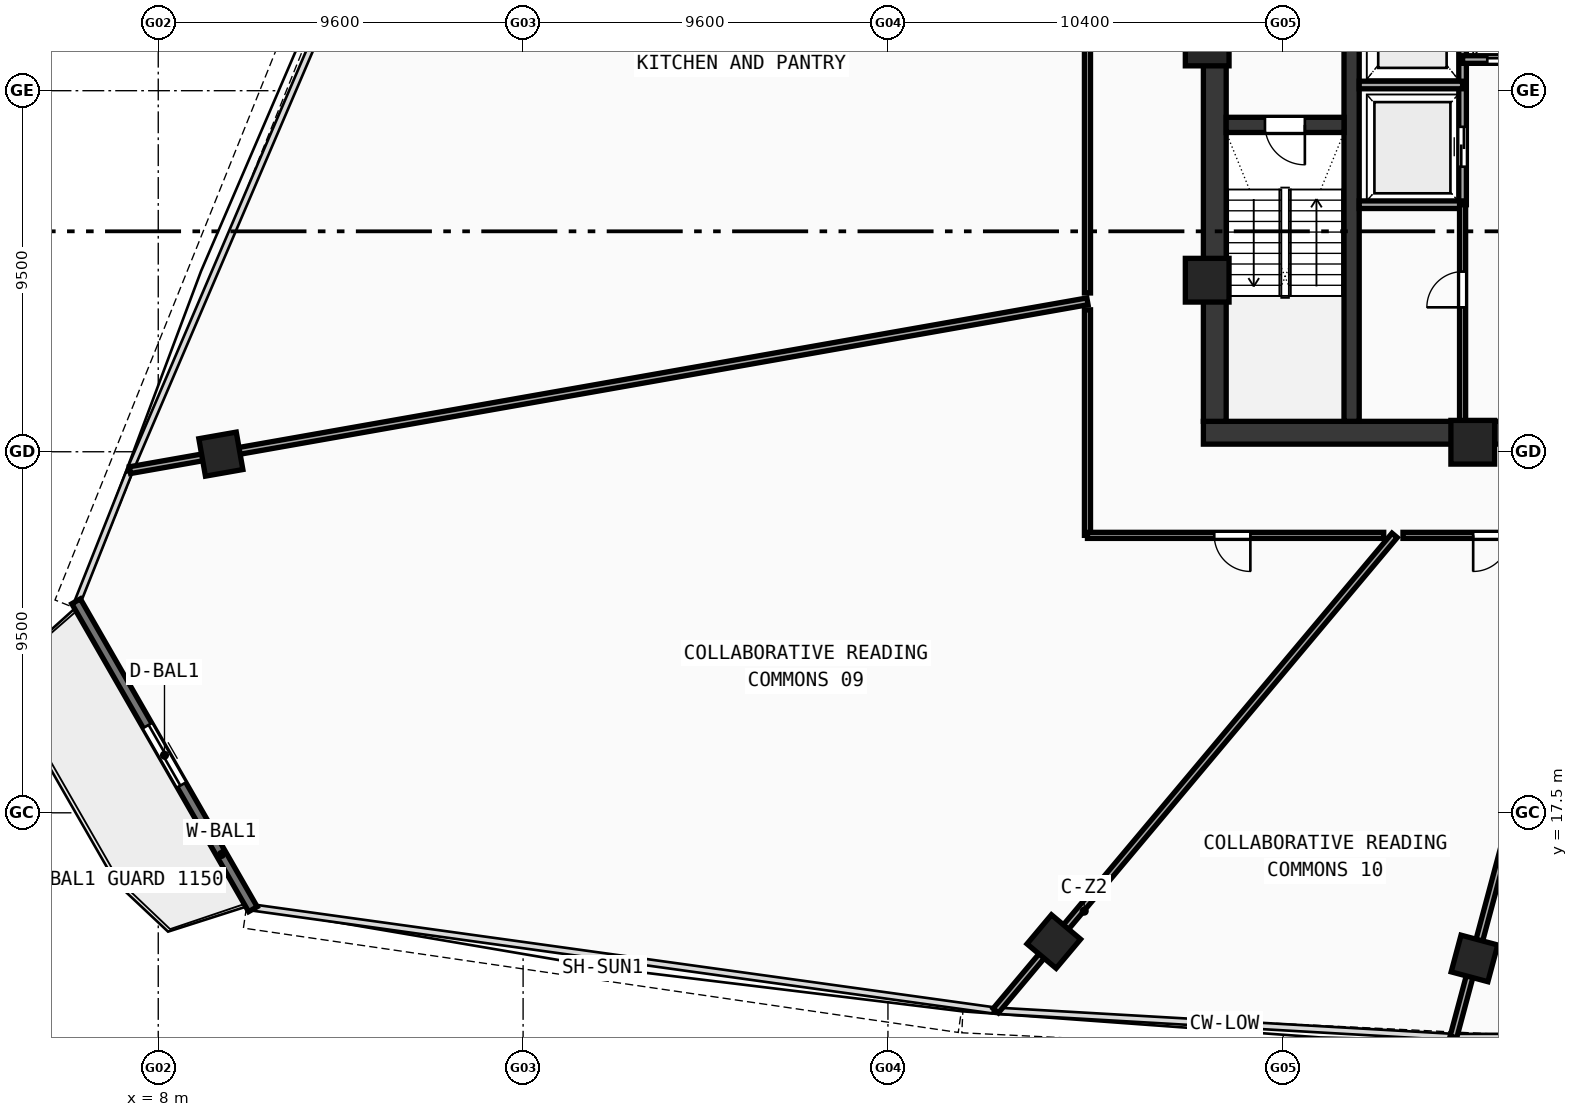
"""IFC4 building model, lengths in metres.
Left out: names, types, materials, properties, quantities, classifications, styles, units other than length and angle.
Written with IfcOpenShell. Run it as: python <this file> out.ifc"""

import sys

from ifc_helpers import new_model, si_unit, direction, frame, frame_2d, origin, origin_with_axes, origin_2d, place, context, subcontext, project, spatial, rectangle, hollow_rectangle, extrude, source, transform, mapped, element, fill, save


model = new_model("IFC4")
c1 = context("Model", 3, precision=1e-05, world=origin(), true_north=direction((0.0, 1.0)))
c2 = subcontext(c1, "Body", "Model", "MODEL_VIEW")
j1 = project(units=[si_unit("LENGTHUNIT", "METRE"), si_unit("PLANEANGLEUNIT", "RADIAN")], contexts=[c1])
p1 = place(None, origin())
s1 = spatial("IfcSite", under=j1, at=p1, CompositionType="ELEMENT")
p2 = place(p1, origin())
s2 = spatial("IfcBuilding", under=s1, at=p2, CompositionType="ELEMENT")
p3 = place(p2, frame((0.0, 0.0, 81.18)))
s3 = spatial("IfcBuildingStorey", under=s2, at=p3, CompositionType="ELEMENT", Elevation=81.18)
p4 = place(p3, frame((35.5, 27.5, 0.0), z_axis=(0.0, 0.0, 1.0), x_axis=(1.0, 0.0, 0.0)))
e1 = element("IfcWall", 1, at=p4, inside=s3, PredefinedType="SHEAR", context=c2, shape_type="SweptSolid", body=[
    extrude(rectangle(XDim=25.0, YDim=0.6, at=frame_2d((12.5, 0.0))), origin(), (0.0, 0.0, 1.0), 3.54),
])
p5 = place(p3, frame((35.8, 27.8, 0.0), z_axis=(0.0, 0.0, 1.0), x_axis=(0.0, 1.0, 0.0)))
e2 = element("IfcWall", 2, at=p5, inside=s3, PredefinedType="SHEAR", context=c2, shape_type="SweptSolid", body=[
    extrude(rectangle(XDim=12.1, YDim=0.6, at=frame_2d((6.05, 0.0))), origin(), (0.0, 0.0, 1.0), 3.54),
])
p6 = place(p3, frame((39.4, 27.8, 0.0), z_axis=(0.0, 0.0, 1.0), x_axis=(0.0, 1.0, 0.0)))
e3 = element("IfcWall", 3, at=p6, inside=s3, PredefinedType="SHEAR", context=c2, shape_type="SweptSolid", body=[
    extrude(rectangle(XDim=12.1, YDim=0.4, at=frame_2d((6.05, 0.0))), origin(), (0.0, 0.0, 1.0), 3.54),
])
p7 = place(p6, frame((9.95, 0.0, 0.0)))
e4 = element("IfcOpeningElement", 4, at=p7, cuts=e3, PredefinedType="OPENING", context=c2, shape_type="SweptSolid", body=[
    extrude(rectangle(XDim=1.1, YDim=2.1, at=frame_2d((0.55, 1.05))), frame((0.0, 0.21, 0.0), z_axis=(0.0, -1.0, 0.0), x_axis=(1.0, 0.0, 0.0)), (0.0, 0.0, 1.0), 0.42),
])
p8 = place(p3, frame((36.1, 35.6, 0.0), z_axis=(0.0, 0.0, 1.0), x_axis=(1.0, 0.0, 0.0)))
e5 = element("IfcWall", 5, at=p8, inside=s3, PredefinedType="SHEAR", context=c2, shape_type="SweptSolid", body=[
    extrude(rectangle(XDim=3.1, YDim=0.4, at=frame_2d((1.55, 0.0))), origin(), (0.0, 0.0, 1.0), 3.54),
])
p9 = place(p8, frame((1.02, 0.0, 0.0)))
e6 = element("IfcOpeningElement", 6, at=p9, cuts=e5, PredefinedType="OPENING", context=c2, shape_type="SweptSolid", body=[
    extrude(rectangle(XDim=1.05, YDim=2.1, at=frame_2d((0.525, 1.05))), frame((0.0, 0.21, 0.0), z_axis=(0.0, -1.0, 0.0), x_axis=(1.0, 0.0, 0.0)), (0.0, 0.0, 1.0), 0.42),
])
m1 = source(origin(), c2, "Body", "SweptSolid", [
    extrude(hollow_rectangle(XDim=1.15, YDim=1.15, WallThickness=0.048, at=origin_2d()), origin(), (0.0, 0.0, 1.0), 3.8),
])
for number, where, z_axis, x_axis in (
    (7, (42.588, 27.25, -0.26), (0.0, 0.0, 1.0), (1.0, 0.0, 0.0)),
    (8, (35.6, 37.729, -0.26), (0.0, 0.0, 1.0), (1.0, 0.0, 0.0)),
    (9, (35.6, 31.513, -0.26), (0.0, 0.0, 1.0), (1.0, 0.0, 0.0)),
):
    element("IfcColumn", number, at=place(p3, frame(where, z_axis=z_axis, x_axis=x_axis)), inside=s3, PredefinedType="COLUMN", context=c2, shape_type="MappedRepresentation", body=[
        mapped(m1, transform((0.0, 0.0, 0.0), scale=1.0)),
    ])
m2 = source(origin(), c2, "Body", "SweptSolid", [
    extrude(hollow_rectangle(XDim=1.0, YDim=1.0, WallThickness=0.042, at=origin_2d()), origin(), (0.0, 0.0, 1.0), 3.8),
])
for number, where, z_axis, x_axis in (
    (10, (31.564, 14.112, -0.26), (0.0, 0.0, 1.0), (0.766, -0.643, 0.0)),
    (11, (42.633, 13.668, -0.26), (0.0, 0.0, 1.0), (0.966, -0.259, 0.0)),
    (12, (9.647, 26.938, -0.26), (0.0, 0.0, 1.0), (0.174, -0.985, 0.0)),
):
    element("IfcColumn", number, at=place(p3, frame(where, z_axis=z_axis, x_axis=x_axis)), inside=s3, PredefinedType="COLUMN", context=c2, shape_type="MappedRepresentation", body=[
        mapped(m2, transform((0.0, 0.0, 0.0), scale=1.0)),
    ])
p10 = place(p3, frame((5.838, 23.065, 0.0), z_axis=(0.0, 0.0, 1.0), x_axis=(0.497922114025, -0.867221752705, 0.0)))
e13 = element("IfcWall", 13, at=p10, inside=s3, PredefinedType="STANDARD", context=c2, shape_type="SweptSolid", body=[
    extrude(rectangle(XDim=9.343, YDim=0.26, at=frame_2d((4.671, 0.0))), origin(), (0.0, 0.0, 1.0), 3.54),
])
p11 = place(p10, frame((3.771, 0.0, 0.0)))
e14 = element("IfcOpeningElement", 14, at=p11, cuts=e13, PredefinedType="OPENING", context=c2, shape_type="SweptSolid", body=[
    extrude(rectangle(XDim=1.8, YDim=2.15, at=frame_2d((0.9, 1.075))), frame((0.0, 0.14, 0.0), z_axis=(0.0, -1.0, 0.0), x_axis=(1.0, 0.0, 0.0)), (0.0, 0.0, 1.0), 0.28),
])
p12 = place(p3, frame((42.32, 33.5, 0.0), z_axis=(0.0, 0.0, 1.0), x_axis=(0.0, 1.0, 0.0)))
e15 = element("IfcWall", 15, at=p12, inside=s3, PredefinedType="SOLIDWALL", context=c2, shape_type="SweptSolid", body=[
    extrude(rectangle(XDim=6.45, YDim=0.2, at=frame_2d((3.225, 0.0))), origin(), (0.0, 0.0, 1.0), 3.54),
])
p13 = place(p12, frame((1.0, 0.0, 0.0)))
e16 = element("IfcOpeningElement", 16, at=p13, cuts=e15, PredefinedType="OPENING", context=c2, shape_type="SweptSolid", body=[
    extrude(rectangle(XDim=1.05, YDim=2.1, at=frame_2d((0.525, 1.05))), frame((0.0, 0.11, 0.0), z_axis=(0.0, -1.0, 0.0), x_axis=(1.0, 0.0, 0.0)), (0.0, 0.0, 1.0), 0.22),
])
for number, where, z_axis, x_axis in (
    (17, (39.6, 36.65, 0.0), (0.0, 0.0, 1.0), (1.0, 0.0, 0.0)),
    (18, (39.6, 33.5, 0.0), (0.0, 0.0, 1.0), (1.0, 0.0, 0.0)),
):
    element("IfcWall", number, at=place(p3, frame(where, z_axis=z_axis, x_axis=x_axis)), inside=s3, PredefinedType="SOLIDWALL", context=c2, shape_type="SweptSolid", body=[
        extrude(rectangle(XDim=2.72, YDim=0.2, at=frame_2d((1.36, 0.0))), origin(), (0.0, 0.0, 1.0), 3.54),
    ])
p14 = place(p3, frame((42.32, 37.32, 0.0), z_axis=(0.0, 0.0, 1.0), x_axis=(1.0, 0.0, 0.0)))
e19 = element("IfcWall", 19, at=p14, inside=s3, PredefinedType="SOLIDWALL", context=c2, shape_type="SweptSolid", body=[
    extrude(rectangle(XDim=4.73, YDim=0.2, at=frame_2d((2.365, 0.0))), origin(), (0.0, 0.0, 1.0), 3.54),
])
p15 = place(p14, frame((0.65, 0.0, 0.0)))
e20 = element("IfcOpeningElement", 20, at=p15, cuts=e19, PredefinedType="OPENING", context=c2, shape_type="SweptSolid", body=[
    extrude(rectangle(XDim=1.05, YDim=2.1, at=frame_2d((0.525, 1.05))), frame((0.0, 0.11, 0.0), z_axis=(0.0, -1.0, 0.0), x_axis=(1.0, 0.0, 0.0)), (0.0, 0.0, 1.0), 0.22),
])
p16 = place(p14, frame((2.95, 0.0, 0.0)))
e21 = element("IfcOpeningElement", 21, at=p16, cuts=e19, PredefinedType="OPENING", context=c2, shape_type="SweptSolid", body=[
    extrude(rectangle(XDim=1.05, YDim=2.1, at=frame_2d((0.525, 1.05))), frame((0.0, 0.11, 0.0), z_axis=(0.0, -1.0, 0.0), x_axis=(1.0, 0.0, 0.0)), (0.0, 0.0, 1.0), 0.22),
])
p17 = place(p3, frame((42.32, 27.6, 0.0), z_axis=(0.0, 0.0, 1.0), x_axis=(0.0, 1.0, 0.0)))
e22 = element("IfcWall", 22, at=p17, inside=s3, PredefinedType="PARTITIONING", context=c2, shape_type="SweptSolid", body=[
    extrude(rectangle(XDim=5.9, YDim=0.16, at=frame_2d((2.95, 0.0))), origin(), (0.0, 0.0, 1.0), 3.54),
])
p18 = place(p17, frame((3.2, 0.0, 0.0)))
e23 = element("IfcOpeningElement", 23, at=p18, cuts=e22, PredefinedType="OPENING", context=c2, shape_type="SweptSolid", body=[
    extrude(rectangle(XDim=0.94, YDim=2.1, at=frame_2d((0.47, 1.05))), frame((0.0, 0.09, 0.0), z_axis=(0.0, -1.0, 0.0), x_axis=(1.0, 0.0, 0.0)), (0.0, 0.0, 1.0), 0.18),
])
p19 = place(p3, frame((32.45, 30.958, 0.0), z_axis=(0.0, 0.0, 1.0), x_axis=(-0.984808048641, -0.173646501066, 0.0)))
e24 = element("IfcWall", 24, at=p19, inside=s3, PredefinedType="PARTITIONING", context=c2, shape_type="SweptSolid", body=[
    extrude(rectangle(XDim=25.582, YDim=0.18, at=frame_2d((12.791, 0.0))), origin(), (0.0, 0.0, 1.0), 2.84),
])
p20 = place(p3, frame((40.532, 24.8, 0.0), z_axis=(0.0, 0.0, 1.0), x_axis=(-0.642790086939, -0.76604236445, 0.0)))
e25 = element("IfcWall", 25, at=p20, inside=s3, PredefinedType="PARTITIONING", context=c2, shape_type="SweptSolid", body=[
    extrude(rectangle(XDim=16.326, YDim=0.18, at=frame_2d((8.163, 0.0))), origin(), (0.0, 0.0, 1.0), 2.84),
])
p21 = place(p3, frame((45.615, 24.8, 0.0), z_axis=(0.0, 0.0, 1.0), x_axis=(-0.25881675816, -0.965926439071, 0.0)))
e26 = element("IfcWall", 26, at=p21, inside=s3, PredefinedType="PARTITIONING", context=c2, shape_type="SweptSolid", body=[
    extrude(rectangle(XDim=13.665, YDim=0.18, at=frame_2d((6.832, 0.0))), origin(), (0.0, 0.0, 1.0), 2.84),
])
p22 = place(p3, frame((32.45, 24.8, 0.0), z_axis=(0.0, 0.0, 1.0), x_axis=(0.0, 1.0, 0.0)))
e27 = element("IfcWall", 27, at=p22, inside=s3, PredefinedType="PARTITIONING", context=c2, shape_type="SweptSolid", body=[
    extrude(rectangle(XDim=5.935, YDim=0.16, at=frame_2d((2.967, 0.0))), origin(), (0.0, 0.0, 1.0), 3.14),
])
p23 = place(p3, frame((32.45, 31.178, 0.0), z_axis=(0.0, 0.0, 1.0), x_axis=(0.0, 1.0, 0.0)))
e28 = element("IfcWall", 28, at=p23, inside=s3, PredefinedType="PARTITIONING", context=c2, shape_type="SweptSolid", body=[
    extrude(rectangle(XDim=16.304, YDim=0.16, at=frame_2d((8.152, 0.0))), origin(), (0.0, 0.0, 1.0), 2.84),
])
p24 = place(p23, frame((7.677, 0.0, 0.0)))
e29 = element("IfcOpeningElement", 29, at=p24, cuts=e28, PredefinedType="OPENING", context=c2, shape_type="SweptSolid", body=[
    extrude(rectangle(XDim=0.95, YDim=2.1, at=frame_2d((0.475, 1.05))), frame((0.0, 0.09, 0.0), z_axis=(0.0, -1.0, 0.0), x_axis=(1.0, 0.0, 0.0)), (0.0, 0.0, 1.0), 0.18),
])
p25 = place(p3, frame((45.387, 24.8, 0.0), z_axis=(0.0, 0.0, 1.0), x_axis=(-1.0, 0.0, 0.0)))
e30 = element("IfcWall", 30, at=p25, inside=s3, PredefinedType="PARTITIONING", context=c2, shape_type="SweptSolid", body=[
    extrude(rectangle(XDim=4.635, YDim=0.16, at=frame_2d((2.318, 0.0))), origin(), (0.0, 0.0, 1.0), 2.84),
])
p26 = place(p25, frame((1.839, 0.0, 0.0)))
e31 = element("IfcOpeningElement", 31, at=p26, cuts=e30, PredefinedType="OPENING", context=c2, shape_type="SweptSolid", body=[
    extrude(rectangle(XDim=0.95, YDim=2.1, at=frame_2d((0.475, 1.05))), frame((0.0, 0.09, 0.0), z_axis=(0.0, -1.0, 0.0), x_axis=(1.0, 0.0, 0.0)), (0.0, 0.0, 1.0), 0.18),
])
p27 = place(p3, frame((40.245, 24.8, 0.0), z_axis=(0.0, 0.0, 1.0), x_axis=(-1.0, 0.0, 0.0)))
e32 = element("IfcWall", 32, at=p27, inside=s3, PredefinedType="PARTITIONING", context=c2, shape_type="SweptSolid", body=[
    extrude(rectangle(XDim=7.795, YDim=0.16, at=frame_2d((3.897, 0.0))), origin(), (0.0, 0.0, 1.0), 3.14),
])
p28 = place(p27, frame((3.509, 0.0, 0.0)))
e33 = element("IfcOpeningElement", 33, at=p28, cuts=e32, PredefinedType="OPENING", context=c2, shape_type="SweptSolid", body=[
    extrude(rectangle(XDim=0.95, YDim=2.1, at=frame_2d((0.475, 1.05))), frame((0.0, 0.09, 0.0), z_axis=(0.0, -1.0, 0.0), x_axis=(1.0, 0.0, 0.0)), (0.0, 0.0, 1.0), 0.18),
])
m3 = source(origin(), c2, "Body", "SweptSolid", [
    extrude(rectangle(XDim=1.8, YDim=2.15, at=frame_2d((0.9, 1.075))), frame((0.0, 0.025, 0.0), z_axis=(0.0, -1.0, 0.0), x_axis=(1.0, 0.0, 0.0)), (0.0, 0.0, 1.0), 0.05),
])
p29 = place(p11, origin_with_axes())
e34 = element("IfcDoor", 34, at=p29, inside=s3, OperationType="DOUBLE_DOOR_SLIDING", PredefinedType="DOOR", context=c2, shape_type="MappedRepresentation", body=[
    mapped(m3, transform((0.0, 0.0, 0.0), scale=1.0)),
])
fill(e14, e34)
m4 = source(origin(), c2, "Body", "SweptSolid", [
    extrude(rectangle(XDim=1.05, YDim=2.1, at=frame_2d((0.525, 1.05))), frame((0.0, 0.025, 0.0), z_axis=(0.0, -1.0, 0.0), x_axis=(1.0, 0.0, 0.0)), (0.0, 0.0, 1.0), 0.05),
])
p30 = place(p9, frame((1.05, 0.0, 0.0), z_axis=(0.0, 0.0, 1.0), x_axis=(-1.0, 0.0, 0.0)))
e35 = element("IfcDoor", 35, at=p30, inside=s3, OperationType="SINGLE_SWING_LEFT", PredefinedType="DOOR", context=c2, shape_type="MappedRepresentation", body=[
    mapped(m4, transform((0.0, 0.0, 0.0), scale=1.0)),
])
fill(e6, e35)
p31 = place(p13, origin_with_axes())
e36 = element("IfcDoor", 36, at=p31, inside=s3, OperationType="DOUBLE_DOOR_SLIDING", PredefinedType="DOOR", context=c2, shape_type="MappedRepresentation", body=[
    mapped(m4, transform((0.0, 0.0, 0.0), scale=1.0)),
])
fill(e16, e36)
p32 = place(p15, frame((1.05, 0.0, 0.0), z_axis=(0.0, 0.0, 1.0), x_axis=(-1.0, 0.0, 0.0)))
e37 = element("IfcDoor", 37, at=p32, inside=s3, OperationType="DOUBLE_DOOR_SLIDING", PredefinedType="DOOR", context=c2, shape_type="MappedRepresentation", body=[
    mapped(m4, transform((0.0, 0.0, 0.0), scale=1.0)),
])
fill(e20, e37)
m5 = source(origin(), c2, "Body", "SweptSolid", [
    extrude(rectangle(XDim=0.94, YDim=2.1, at=frame_2d((0.47, 1.05))), frame((0.0, 0.025, 0.0), z_axis=(0.0, -1.0, 0.0), x_axis=(1.0, 0.0, 0.0)), (0.0, 0.0, 1.0), 0.05),
])
p33 = place(p18, origin_with_axes())
e38 = element("IfcDoor", 38, at=p33, inside=s3, OperationType="SINGLE_SWING_LEFT", PredefinedType="DOOR", context=c2, shape_type="MappedRepresentation", body=[
    mapped(m5, transform((0.0, 0.0, 0.0), scale=1.0)),
])
fill(e23, e38)
m6 = source(origin(), c2, "Body", "SweptSolid", [
    extrude(rectangle(XDim=0.95, YDim=2.1, at=frame_2d((0.475, 1.05))), frame((0.0, 0.025, 0.0), z_axis=(0.0, -1.0, 0.0), x_axis=(1.0, 0.0, 0.0)), (0.0, 0.0, 1.0), 0.05),
])
p34 = place(p28, origin_with_axes())
e39 = element("IfcDoor", 39, at=p34, inside=s3, OperationType="SINGLE_SWING_LEFT", PredefinedType="DOOR", context=c2, shape_type="MappedRepresentation", body=[
    mapped(m6, transform((0.0, 0.0, 0.0), scale=1.0)),
])
fill(e33, e39)
p35 = place(p26, origin_with_axes())
e40 = element("IfcDoor", 40, at=p35, inside=s3, OperationType="SINGLE_SWING_RIGHT", PredefinedType="DOOR", context=c2, shape_type="MappedRepresentation", body=[
    mapped(m6, transform((0.0, 0.0, 0.0), scale=1.0)),
])
fill(e31, e40)
save(model, sys.argv[1])
